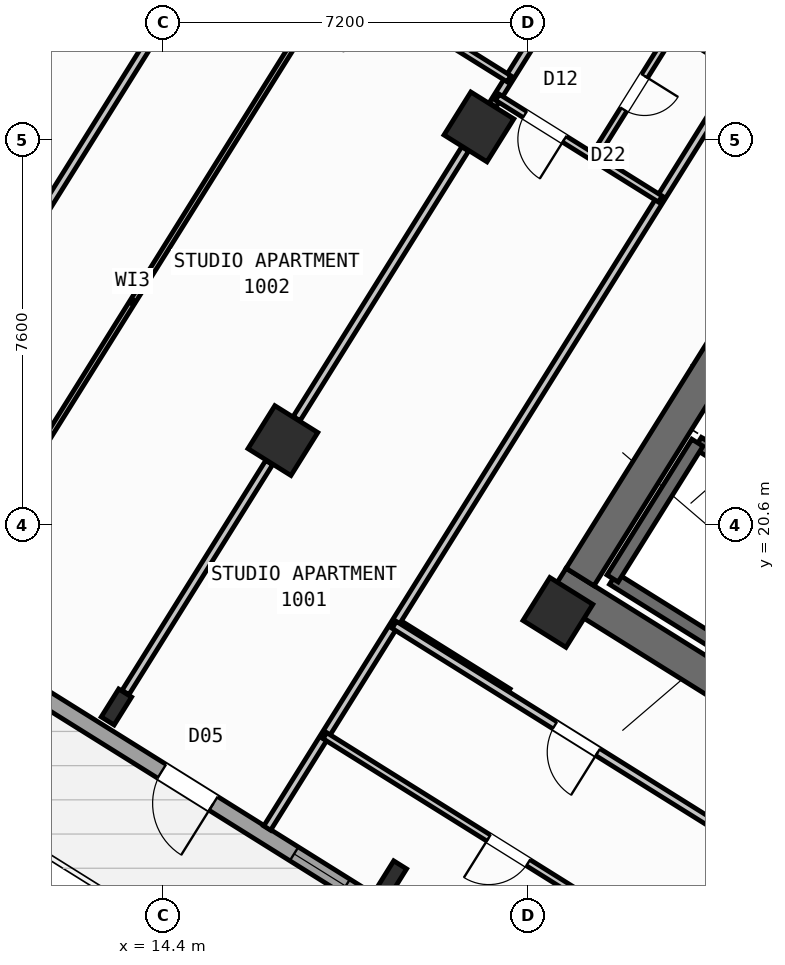
"""IFC4 building model, lengths in metres.
Left out: names, types, materials, properties, quantities, classifications, styles, units other than length and angle.
Written with IfcOpenShell. Run it as: python <this file> out.ifc"""

import sys

from ifc_helpers import new_model, si_unit, direction, frame, frame_2d, origin, origin_2d, place, context, subcontext, project, spatial, rectangle, hollow_rectangle, i_section, extrude, source, transform, mapped, element, fill, save


model = new_model("IFC4")
c1 = context("Model", 3, precision=1e-05, world=origin(), true_north=direction((0.0, 1.0)))
c2 = subcontext(c1, "Body", "Model", "MODEL_VIEW")
j1 = project(units=[si_unit("LENGTHUNIT", "METRE"), si_unit("PLANEANGLEUNIT", "RADIAN")], contexts=[c1])
p1 = place(None, origin())
s1 = spatial("IfcSite", under=j1, at=p1, CompositionType="ELEMENT")
p2 = place(p1, origin())
s2 = spatial("IfcBuilding", under=s1, at=p2, CompositionType="ELEMENT")
p3 = place(p2, frame((0.0, 0.0, 42.0)))
s3 = spatial("IfcBuildingStorey", under=s2, at=p3, CompositionType="ELEMENT", Elevation=42.0)
p4 = place(p3, frame((33.409, 12.45, 0.0), z_axis=(0.0, 0.0, 1.0), x_axis=(-0.848051132073, 0.529914405721, 0.0)))
e1 = element("IfcWall", 1, at=p4, inside=s3, PredefinedType="SHEAR", context=c2, shape_type="SweptSolid", body=[
    extrude(rectangle(XDim=13.24, YDim=0.65, at=frame_2d((6.62, 0.0))), origin(), (0.0, 0.0, 1.0), 3.35),
])
p5 = place(p3, frame((26.007, 24.976, 0.0), z_axis=(0.0, 0.0, 1.0), x_axis=(-0.529916319127, -0.848049936456, 0.0)))
e2 = element("IfcWall", 2, at=p5, inside=s3, PredefinedType="SHEAR", context=c2, shape_type="SweptSolid", body=[
    extrude(rectangle(XDim=6.375, YDim=0.65, at=frame_2d((3.188, 0.0))), origin(), (0.0, 0.0, 1.0), 3.35),
])
m1 = source(origin(), c2, "Body", "SweptSolid", [
    extrude(hollow_rectangle(XDim=1.0, YDim=1.0, WallThickness=0.04, at=origin_2d()), origin(), (0.0, 0.0, 1.0), 3.6),
])
p6 = place(p3, frame((22.191, 18.87, 0.0), z_axis=(0.0, 0.0, 1.0), x_axis=(-0.848048096156, 0.529919264233, 0.0)))
e3 = element("IfcColumn", 3, at=p6, inside=s3, PredefinedType="COLUMN", context=c2, shape_type="MappedRepresentation", body=[
    mapped(m1, transform((0.0, 0.0, 0.0), scale=1.0)),
])
m2 = source(origin(), c2, "Body", "SweptSolid", [
    extrude(i_section(OverallWidth=0.3, OverallDepth=0.65, WebThickness=0.016, FlangeThickness=0.031, at=origin_2d()), origin(), (0.0, 0.0, 1.0), 3.6),
])
p7 = place(p3, frame((18.906, 13.612, 0.0), z_axis=(0.0, 0.0, 1.0), x_axis=(-0.848048096156, 0.529919264233, 0.0)))
e4 = element("IfcColumn", 4, at=p7, inside=s3, PredefinedType="COLUMN", context=c2, shape_type="MappedRepresentation", body=[
    mapped(m2, transform((0.0, 0.0, 0.0), scale=1.0)),
])
for number, where, z_axis, x_axis in (
    (5, (20.632, 28.452, 0.0), (0.0, 0.0, 1.0), (-0.848, 0.53, 0.0)),
    (6, (16.764, 22.261, 0.0), (0.0, 0.0, 1.0), (-0.848, 0.53, 0.0)),
):
    element("IfcColumn", number, at=place(p3, frame(where, z_axis=z_axis, x_axis=x_axis)), inside=s3, PredefinedType="COLUMN", context=c2, shape_type="MappedRepresentation", body=[
        mapped(m1, transform((0.0, 0.0, 0.0), scale=1.0)),
    ])
p8 = place(p3, frame((13.478, 17.003, 0.0), z_axis=(0.0, 0.0, 1.0), x_axis=(-0.848048096156, 0.529919264233, 0.0)))
e7 = element("IfcColumn", 7, at=p8, inside=s3, PredefinedType="COLUMN", context=c2, shape_type="MappedRepresentation", body=[
    mapped(m2, transform((0.0, 0.0, 0.0), scale=1.0)),
])
p9 = place(p3, frame((29.268, 6.429, 0.0), z_axis=(0.0, 0.0, 1.0), x_axis=(-0.848049971435, 0.529916263149, 0.0)))
e8 = element("IfcWall", 8, at=p9, inside=s3, PredefinedType="STANDARD", context=c2, shape_type="SweptSolid", body=[
    extrude(rectangle(XDim=31.588, YDim=0.32, at=frame_2d((15.794, 0.0))), origin(), (0.0, 0.0, 1.0), 3.35),
])
p10 = place(p9, frame((16.362, 0.0, 0.0)))
e9 = element("IfcOpeningElement", 9, at=p10, cuts=e8, PredefinedType="OPENING", context=c2, shape_type="SweptSolid", body=[
    extrude(rectangle(XDim=1.2, YDim=2.15, at=frame_2d((0.6, 1.075))), frame((0.0, 0.17, 0.0), z_axis=(0.0, -1.0, 0.0), x_axis=(1.0, 0.0, 0.0)), (0.0, 0.0, 1.0), 0.34),
])
p11 = place(p9, frame((2.989, 0.0, 0.8)))
e10 = element("IfcOpeningElement", 10, at=p11, cuts=e8, PredefinedType="OPENING", context=c2, shape_type="SweptSolid", body=[
    extrude(rectangle(XDim=2.1, YDim=1.55, at=frame_2d((1.05, 0.775))), frame((0.0, 0.17, 0.0), z_axis=(0.0, -1.0, 0.0), x_axis=(1.0, 0.0, 0.0)), (0.0, 0.0, 1.0), 0.34),
])
p12 = place(p9, frame((8.359, 0.0, 0.8)))
e11 = element("IfcOpeningElement", 11, at=p12, cuts=e8, PredefinedType="OPENING", context=c2, shape_type="SweptSolid", body=[
    extrude(rectangle(XDim=2.1, YDim=1.55, at=frame_2d((1.05, 0.775))), frame((0.0, 0.17, 0.0), z_axis=(0.0, -1.0, 0.0), x_axis=(1.0, 0.0, 0.0)), (0.0, 0.0, 1.0), 0.34),
])
p13 = place(p9, frame((13.284, 0.0, 0.95)))
e12 = element("IfcOpeningElement", 12, at=p13, cuts=e8, PredefinedType="OPENING", context=c2, shape_type="SweptSolid", body=[
    extrude(rectangle(XDim=1.2, YDim=1.4, at=frame_2d((0.6, 0.7))), frame((0.0, 0.17, 0.0), z_axis=(0.0, -1.0, 0.0), x_axis=(1.0, 0.0, 0.0)), (0.0, 0.0, 1.0), 0.34),
])
p14 = place(p9, frame((20.39, 0.0, 0.95)))
e13 = element("IfcOpeningElement", 13, at=p14, cuts=e8, PredefinedType="OPENING", context=c2, shape_type="SweptSolid", body=[
    extrude(rectangle(XDim=1.2, YDim=1.4, at=frame_2d((0.6, 0.7))), frame((0.0, 0.17, 0.0), z_axis=(0.0, -1.0, 0.0), x_axis=(1.0, 0.0, 0.0)), (0.0, 0.0, 1.0), 0.34),
])
p15 = place(p9, frame((23.715, 0.0, 1.0)))
e14 = element("IfcOpeningElement", 14, at=p15, cuts=e8, PredefinedType="OPENING", context=c2, shape_type="SweptSolid", body=[
    extrude(rectangle(XDim=0.9, YDim=1.25, at=frame_2d((0.45, 0.625))), frame((0.0, 0.17, 0.0), z_axis=(0.0, -1.0, 0.0), x_axis=(1.0, 0.0, 0.0)), (0.0, 0.0, 1.0), 0.34),
])
p16 = place(p9, frame((27.481, 0.0, 0.8)))
e15 = element("IfcOpeningElement", 15, at=p16, cuts=e8, PredefinedType="OPENING", context=c2, shape_type="SweptSolid", body=[
    extrude(rectangle(XDim=2.1, YDim=1.55, at=frame_2d((1.05, 0.775))), frame((0.0, 0.17, 0.0), z_axis=(0.0, -1.0, 0.0), x_axis=(1.0, 0.0, 0.0)), (0.0, 0.0, 1.0), 0.34),
])
p17 = place(p3, frame((2.415, 23.452, 0.0), z_axis=(0.0, 0.0, 1.0), x_axis=(0.52991049553, 0.848053575387, 0.0)))
e16 = element("IfcWall", 16, at=p17, inside=s3, PredefinedType="STANDARD", context=c2, shape_type="SweptSolid", body=[
    extrude(rectangle(XDim=21.587, YDim=0.32, at=frame_2d((10.794, 0.0))), origin(), (0.0, 0.0, 1.0), 2.725),
])
p18 = place(p17, frame((2.356, 0.0, 0.8)))
e17 = element("IfcOpeningElement", 17, at=p18, cuts=e16, PredefinedType="OPENING", context=c2, shape_type="SweptSolid", body=[
    extrude(rectangle(XDim=2.1, YDim=1.55, at=frame_2d((1.05, 0.775))), frame((0.0, 0.17, 0.0), z_axis=(0.0, -1.0, 0.0), x_axis=(1.0, 0.0, 0.0)), (0.0, 0.0, 1.0), 0.34),
])
p19 = place(p17, frame((9.344, 0.0, 0.85)))
e18 = element("IfcOpeningElement", 18, at=p19, cuts=e16, PredefinedType="OPENING", context=c2, shape_type="SweptSolid", body=[
    extrude(rectangle(XDim=1.8, YDim=1.5, at=frame_2d((0.9, 0.75))), frame((0.0, 0.17, 0.0), z_axis=(0.0, -1.0, 0.0), x_axis=(1.0, 0.0, 0.0)), (0.0, 0.0, 1.0), 0.34),
])
p20 = place(p17, frame((15.154, 0.0, 0.85)))
e19 = element("IfcOpeningElement", 19, at=p20, cuts=e16, PredefinedType="OPENING", context=c2, shape_type="SweptSolid", body=[
    extrude(rectangle(XDim=1.5, YDim=1.5, at=frame_2d((0.75, 0.75))), frame((0.0, 0.17, 0.0), z_axis=(0.0, -1.0, 0.0), x_axis=(1.0, 0.0, 0.0)), (0.0, 0.0, 1.0), 0.34),
])
p21 = place(p3, frame((14.138, 41.825, 0.0), z_axis=(0.0, 0.0, 1.0), x_axis=(0.848046498049, -0.529921821731, 0.0)))
e20 = element("IfcWall", 20, at=p21, inside=s3, PredefinedType="STANDARD", context=c2, shape_type="SweptSolid", body=[
    extrude(rectangle(XDim=31.588, YDim=0.32, at=frame_2d((15.794, 0.0))), origin(), (0.0, 0.0, 1.0), 3.35),
])
p22 = place(p21, frame((3.369, 0.0, 0.0)))
e21 = element("IfcOpeningElement", 21, at=p22, cuts=e20, PredefinedType="OPENING", context=c2, shape_type="SweptSolid", body=[
    extrude(rectangle(XDim=1.05, YDim=2.15, at=frame_2d((0.525, 1.075))), frame((0.0, 0.17, 0.0), z_axis=(0.0, -1.0, 0.0), x_axis=(1.0, 0.0, 0.0)), (0.0, 0.0, 1.0), 0.34),
])
p23 = place(p21, frame((0.946, 0.0, 0.85)))
e22 = element("IfcOpeningElement", 22, at=p23, cuts=e20, PredefinedType="OPENING", context=c2, shape_type="SweptSolid", body=[
    extrude(rectangle(XDim=1.8, YDim=1.5, at=frame_2d((0.9, 0.75))), frame((0.0, 0.17, 0.0), z_axis=(0.0, -1.0, 0.0), x_axis=(1.0, 0.0, 0.0)), (0.0, 0.0, 1.0), 0.34),
])
p24 = place(p21, frame((8.46, 0.0, 0.85)))
e23 = element("IfcOpeningElement", 23, at=p24, cuts=e20, PredefinedType="OPENING", context=c2, shape_type="SweptSolid", body=[
    extrude(rectangle(XDim=1.8, YDim=1.5, at=frame_2d((0.9, 0.75))), frame((0.0, 0.17, 0.0), z_axis=(0.0, -1.0, 0.0), x_axis=(1.0, 0.0, 0.0)), (0.0, 0.0, 1.0), 0.34),
])
p25 = place(p21, frame((13.899, 0.0, 0.85)))
e24 = element("IfcOpeningElement", 24, at=p25, cuts=e20, PredefinedType="OPENING", context=c2, shape_type="SweptSolid", body=[
    extrude(rectangle(XDim=1.5, YDim=1.5, at=frame_2d((0.75, 0.75))), frame((0.0, 0.17, 0.0), z_axis=(0.0, -1.0, 0.0), x_axis=(1.0, 0.0, 0.0)), (0.0, 0.0, 1.0), 0.34),
])
p26 = place(p21, frame((22.019, 0.0, 0.95)))
e25 = element("IfcOpeningElement", 25, at=p26, cuts=e20, PredefinedType="OPENING", context=c2, shape_type="SweptSolid", body=[
    extrude(rectangle(XDim=1.2, YDim=1.4, at=frame_2d((0.6, 0.7))), frame((0.0, 0.17, 0.0), z_axis=(0.0, -1.0, 0.0), x_axis=(1.0, 0.0, 0.0)), (0.0, 0.0, 1.0), 0.34),
])
p27 = place(p21, frame((27.569, 0.0, 0.95)))
e26 = element("IfcOpeningElement", 26, at=p27, cuts=e20, PredefinedType="OPENING", context=c2, shape_type="SweptSolid", body=[
    extrude(rectangle(XDim=1.2, YDim=1.4, at=frame_2d((0.6, 0.7))), frame((0.0, 0.17, 0.0), z_axis=(0.0, -1.0, 0.0), x_axis=(1.0, 0.0, 0.0)), (0.0, 0.0, 1.0), 0.34),
])
p28 = place(p3, frame((29.605, 15.581, 0.0), z_axis=(0.0, 0.0, 1.0), x_axis=(-0.848036911448, 0.529937163087, 0.0)))
e27 = element("IfcWall", 27, at=p28, inside=s3, PredefinedType="SHEAR", context=c2, shape_type="SweptSolid", body=[
    extrude(rectangle(XDim=7.46, YDim=0.26, at=frame_2d((3.73, 0.0))), origin(), (0.0, 0.0, 1.0), 3.35),
])
p29 = place(p3, frame((31.28, 18.261, 0.0), z_axis=(0.0, 0.0, 1.0), x_axis=(-0.848051618787, 0.529913626805, 0.0)))
e28 = element("IfcWall", 28, at=p29, inside=s3, PredefinedType="SHEAR", context=c2, shape_type="SweptSolid", body=[
    extrude(rectangle(XDim=7.46, YDim=0.26, at=frame_2d((3.73, 0.0))), origin(), (0.0, 0.0, 1.0), 3.35),
])
p30 = place(p29, frame((0.36, 0.0, 0.0)))
e29 = element("IfcOpeningElement", 29, at=p30, cuts=e28, PredefinedType="OPENING", context=c2, shape_type="SweptSolid", body=[
    extrude(rectangle(XDim=0.86, YDim=2.05, at=frame_2d((0.43, 1.025))), frame((0.0, 0.14, 0.0), z_axis=(0.0, -1.0, 0.0), x_axis=(1.0, 0.0, 0.0)), (0.0, 0.0, 1.0), 0.28),
])
p31 = place(p3, frame((24.945, 22.22, 0.0), z_axis=(0.0, 0.0, 1.0), x_axis=(-0.529908658664, -0.84805472316, 0.0)))
e30 = element("IfcWall", 30, at=p31, inside=s3, PredefinedType="SHEAR", context=c2, shape_type="SweptSolid", body=[
    extrude(rectangle(XDim=3.16, YDim=0.26, at=frame_2d((1.58, 0.0))), origin(), (0.0, 0.0, 1.0), 3.35),
])
p32 = place(p3, frame((21.206, 17.292, 0.0), z_axis=(0.0, 0.0, 1.0), x_axis=(-0.848050851465, 0.529914854792, 0.0)))
e31 = element("IfcWall", 31, at=p32, inside=s3, PredefinedType="PARTITIONING", context=c2, shape_type="SweptSolid", body=[
    extrude(rectangle(XDim=2.61, YDim=0.16, at=frame_2d((1.305, 0.0))), origin(), (0.0, 0.0, 1.0), 3.34),
])
p33 = place(p3, frame((25.807, 29.582, 0.0), z_axis=(0.0, 0.0, 1.0), x_axis=(-0.529918119251, -0.84804881162, 0.0)))
e32 = element("IfcWall", 32, at=p33, inside=s3, PredefinedType="PARTITIONING", context=c2, shape_type="SweptSolid", body=[
    extrude(rectangle(XDim=17.65, YDim=0.16, at=frame_2d((8.825, 0.0))), origin(), (0.0, 0.0, 1.0), 3.34),
])
p34 = place(p3, frame((25.807, 29.582, 0.0), z_axis=(0.0, 0.0, 1.0), x_axis=(-0.848052408131, 0.529912363569, 0.0)))
e33 = element("IfcWall", 33, at=p34, inside=s3, PredefinedType="PARTITIONING", context=c2, shape_type="SweptSolid", body=[
    extrude(rectangle(XDim=16.73, YDim=0.16, at=frame_2d((8.365, 0.0))), origin(), (0.0, 0.0, 1.0), 3.34),
])
p35 = place(p34, frame((2.22, 0.0, 0.0)))
e34 = element("IfcOpeningElement", 34, at=p35, cuts=e33, PredefinedType="OPENING", context=c2, shape_type="SweptSolid", body=[
    extrude(rectangle(XDim=0.86, YDim=2.05, at=frame_2d((0.43, 1.025))), frame((0.0, 0.09, 0.0), z_axis=(0.0, -1.0, 0.0), x_axis=(1.0, 0.0, 0.0)), (0.0, 0.0, 1.0), 0.18),
])
p36 = place(p34, frame((7.82, 0.0, 0.0)))
e35 = element("IfcOpeningElement", 35, at=p36, cuts=e33, PredefinedType="OPENING", context=c2, shape_type="SweptSolid", body=[
    extrude(rectangle(XDim=1.0, YDim=2.1, at=frame_2d((0.5, 1.05))), frame((0.0, 0.09, 0.0), z_axis=(0.0, -1.0, 0.0), x_axis=(1.0, 0.0, 0.0)), (0.0, 0.0, 1.0), 0.18),
])
p37 = place(p34, frame((12.95, 0.0, 0.0)))
e36 = element("IfcOpeningElement", 36, at=p37, cuts=e33, PredefinedType="OPENING", context=c2, shape_type="SweptSolid", body=[
    extrude(rectangle(XDim=1.0, YDim=2.1, at=frame_2d((0.5, 1.05))), frame((0.0, 0.09, 0.0), z_axis=(0.0, -1.0, 0.0), x_axis=(1.0, 0.0, 0.0)), (0.0, 0.0, 1.0), 0.18),
])
p38 = place(p3, frame((22.593, 31.59, 0.0), z_axis=(0.0, 0.0, 1.0), x_axis=(-0.529930102756, -0.848041323399, 0.0)))
e37 = element("IfcWall", 37, at=p38, inside=s3, PredefinedType="PARTITIONING", context=c2, shape_type="SweptSolid", body=[
    extrude(rectangle(XDim=3.188, YDim=0.16, at=frame_2d((1.594, 0.0))), origin(), (0.0, 0.0, 1.0), 2.725),
])
p39 = place(p3, frame((20.361, 28.018, 0.0), z_axis=(0.0, 0.0, 1.0), x_axis=(-0.529915015264, -0.848050751193, 0.0)))
e38 = element("IfcWall", 38, at=p39, inside=s3, PredefinedType="PARTITIONING", context=c2, shape_type="SweptSolid", body=[
    extrude(rectangle(XDim=6.276, YDim=0.16, at=frame_2d((3.138, 0.0))), origin(), (0.0, 0.0, 1.0), 2.725),
])
p40 = place(p3, frame((16.492, 21.827, 0.0), z_axis=(0.0, 0.0, 1.0), x_axis=(-0.529904608059, -0.848057254175, 0.0)))
e39 = element("IfcWall", 39, at=p40, inside=s3, PredefinedType="PARTITIONING", context=c2, shape_type="SweptSolid", body=[
    extrude(rectangle(XDim=5.351, YDim=0.16, at=frame_2d((2.675, 0.0))), origin(), (0.0, 0.0, 1.0), 2.725),
])
p41 = place(p3, frame((24.212, 27.029, 0.0), z_axis=(0.0, 0.0, 1.0), x_axis=(-0.84803087207, 0.529946827537, 0.0)))
e40 = element("IfcWall", 40, at=p41, inside=s3, PredefinedType="PLUMBINGWALL", context=c2, shape_type="SweptSolid", body=[
    extrude(rectangle(XDim=3.79, YDim=0.14, at=frame_2d((1.895, 0.0))), origin(), (0.0, 0.0, 1.0), 3.34),
])
p42 = place(p41, frame((2.23, 0.0, 0.0)))
e41 = element("IfcOpeningElement", 41, at=p42, cuts=e40, PredefinedType="OPENING", context=c2, shape_type="SweptSolid", body=[
    extrude(rectangle(XDim=0.92, YDim=2.08, at=frame_2d((0.46, 1.04))), frame((0.0, 0.08, 0.0), z_axis=(0.0, -1.0, 0.0), x_axis=(1.0, 0.0, 0.0)), (0.0, 0.0, 1.0), 0.16),
])
p43 = place(p3, frame((24.492, 30.403, 0.0), z_axis=(0.0, 0.0, 1.0), x_axis=(-0.529977067289, -0.848011974059, 0.0)))
e42 = element("IfcWall", 42, at=p43, inside=s3, PredefinedType="PLUMBINGWALL", context=c2, shape_type="SweptSolid", body=[
    extrude(rectangle(XDim=3.01, YDim=0.14, at=frame_2d((1.505, 0.0))), origin(), (0.0, 0.0, 1.0), 2.995),
])
p44 = place(p43, frame((1.115, 0.0, 0.0)))
e43 = element("IfcOpeningElement", 43, at=p44, cuts=e42, PredefinedType="OPENING", context=c2, shape_type="SweptSolid", body=[
    extrude(rectangle(XDim=0.78, YDim=2.05, at=frame_2d((0.39, 1.025))), frame((0.0, 0.08, 0.0), z_axis=(0.0, -1.0, 0.0), x_axis=(1.0, 0.0, 0.0)), (0.0, 0.0, 1.0), 0.16),
])
p45 = place(p3, frame((14.933, 31.409, 0.0), z_axis=(0.0, 0.0, 1.0), x_axis=(-0.529897533635, -0.848061674554, 0.0)))
e44 = element("IfcWall", 44, at=p45, inside=s3, PredefinedType="PARTITIONING", context=c2, shape_type="SweptSolid", body=[
    extrude(rectangle(XDim=6.276, YDim=0.16, at=frame_2d((3.138, 0.0))), origin(), (0.0, 0.0, 1.0), 2.725),
])
p46 = place(p3, frame((21.226, 29.402, 0.0), z_axis=(0.0, 0.0, 1.0), x_axis=(-0.848039019877, 0.529933789039, 0.0)))
e45 = element("IfcWall", 45, at=p46, inside=s3, PredefinedType="PLUMBINGWALL", context=c2, shape_type="SweptSolid", body=[
    extrude(rectangle(XDim=6.4, YDim=0.14, at=frame_2d((3.2, 0.0))), origin(), (0.0, 0.0, 1.0), 3.34),
])
p47 = place(p46, frame((2.824, 0.0, 0.0)))
e46 = element("IfcOpeningElement", 46, at=p47, cuts=e45, PredefinedType="OPENING", context=c2, shape_type="SweptSolid", body=[
    extrude(rectangle(XDim=0.78, YDim=2.05, at=frame_2d((0.39, 1.025))), frame((0.0, 0.08, 0.0), z_axis=(0.0, -1.0, 0.0), x_axis=(1.0, 0.0, 0.0)), (0.0, 0.0, 1.0), 0.16),
])
p48 = place(p3, frame((17.861, 31.505, 0.0), z_axis=(0.0, 0.0, 1.0), x_axis=(-0.529928839727, -0.848042112649, 0.0)))
e47 = element("IfcWall", 47, at=p48, inside=s3, PredefinedType="PARTITIONING", context=c2, shape_type="SweptSolid", body=[
    extrude(rectangle(XDim=15.34, YDim=0.11, at=frame_2d((7.67, 0.0))), origin(), (0.0, 0.0, 1.0), 3.34),
])
p49 = place(p48, frame((0.35, 0.0, 0.0)))
e48 = element("IfcOpeningElement", 48, at=p49, cuts=e47, PredefinedType="OPENING", context=c2, shape_type="SweptSolid", body=[
    extrude(rectangle(XDim=0.92, YDim=2.08, at=frame_2d((0.46, 1.04))), frame((0.0, 0.065, 0.0), z_axis=(0.0, -1.0, 0.0), x_axis=(1.0, 0.0, 0.0)), (0.0, 0.0, 1.0), 0.13),
])
p50 = place(p3, frame((32.164, 10.374, 0.0), z_axis=(0.0, 0.0, 1.0), x_axis=(-0.848044107957, 0.529925646633, 0.0)))
e49 = element("IfcWall", 49, at=p50, inside=s3, PredefinedType="PARTITIONING", context=c2, shape_type="SweptSolid", body=[
    extrude(rectangle(XDim=15.57, YDim=0.16, at=frame_2d((7.785, 0.0))), origin(), (0.0, 0.0, 1.0), 3.34),
])
p51 = place(p50, frame((10.83, 0.0, 0.0)))
e50 = element("IfcOpeningElement", 50, at=p51, cuts=e49, PredefinedType="OPENING", context=c2, shape_type="SweptSolid", body=[
    extrude(rectangle(XDim=1.0, YDim=2.1, at=frame_2d((0.5, 1.05))), frame((0.0, 0.09, 0.0), z_axis=(0.0, -1.0, 0.0), x_axis=(1.0, 0.0, 0.0)), (0.0, 0.0, 1.0), 0.18),
])
p52 = place(p3, frame((29.72, 8.859, 0.0), z_axis=(0.0, 0.0, 1.0), x_axis=(-0.848049134363, 0.529917602752, 0.0)))
e51 = element("IfcWall", 51, at=p52, inside=s3, PredefinedType="PLUMBINGWALL", context=c2, shape_type="SweptSolid", body=[
    extrude(rectangle(XDim=14.3, YDim=0.14, at=frame_2d((7.15, 0.0))), origin(), (0.0, 0.0, 1.0), 3.34),
])
p53 = place(p52, frame((9.57, 0.0, 0.0)))
e52 = element("IfcOpeningElement", 52, at=p53, cuts=e51, PredefinedType="OPENING", context=c2, shape_type="SweptSolid", body=[
    extrude(rectangle(XDim=0.92, YDim=2.08, at=frame_2d((0.46, 1.04))), frame((0.0, 0.08, 0.0), z_axis=(0.0, -1.0, 0.0), x_axis=(1.0, 0.0, 0.0)), (0.0, 0.0, 1.0), 0.16),
])
p54 = place(p3, frame((26.237, 14.078, 0.0), z_axis=(0.0, 0.0, 1.0), x_axis=(-0.52995640672, -0.848024885824, 0.0)))
e53 = element("IfcWall", 53, at=p54, inside=s3, PredefinedType="PLUMBINGWALL", context=c2, shape_type="SweptSolid", body=[
    extrude(rectangle(XDim=2.58, YDim=0.14, at=frame_2d((1.29, 0.0))), origin(), (0.0, 0.0, 1.0), 3.34),
])
p55 = place(p54, frame((0.9, 0.0, 0.0)))
e54 = element("IfcOpeningElement", 54, at=p55, cuts=e53, PredefinedType="OPENING", context=c2, shape_type="SweptSolid", body=[
    extrude(rectangle(XDim=0.78, YDim=2.05, at=frame_2d((0.39, 1.025))), frame((0.0, 0.08, 0.0), z_axis=(0.0, -1.0, 0.0), x_axis=(1.0, 0.0, 0.0)), (0.0, 0.0, 1.0), 0.16),
])
m3 = source(origin(), c2, "Body", "SweptSolid", [
    extrude(rectangle(XDim=1.2, YDim=2.15, at=frame_2d((0.6, 1.075))), frame((0.0, 0.025, 0.0), z_axis=(0.0, -1.0, 0.0), x_axis=(1.0, 0.0, 0.0)), (0.0, 0.0, 1.0), 0.05),
])
p56 = place(p10, origin())
e55 = element("IfcDoor", 55, at=p56, inside=s3, OperationType="SINGLE_SWING_LEFT", PredefinedType="DOOR", context=c2, shape_type="MappedRepresentation", body=[
    mapped(m3, transform((0.0, 0.0, 0.0), scale=1.0)),
])
fill(e9, e55)
m4 = source(origin(), c2, "Body", "SweptSolid", [
    extrude(rectangle(XDim=1.2, YDim=1.4, at=frame_2d((0.6, 0.7))), frame((0.0, 0.03, 0.0), z_axis=(0.0, -1.0, 0.0), x_axis=(1.0, 0.0, 0.0)), (0.0, 0.0, 1.0), 0.06),
])
p57 = place(p13, origin())
e56 = element("IfcWindow", 56, at=p57, inside=s3, PartitioningType="SINGLE_PANEL", PredefinedType="WINDOW", context=c2, shape_type="MappedRepresentation", body=[
    mapped(m4, transform((0.0, 0.0, 0.0), scale=1.0)),
])
fill(e12, e56)
m5 = source(origin(), c2, "Body", "SweptSolid", [
    extrude(rectangle(XDim=0.92, YDim=2.08, at=frame_2d((0.46, 1.04))), frame((0.0, 0.025, 0.0), z_axis=(0.0, -1.0, 0.0), x_axis=(1.0, 0.0, 0.0)), (0.0, 0.0, 1.0), 0.05),
])
p58 = place(p42, origin())
e57 = element("IfcDoor", 57, at=p58, inside=s3, OperationType="SINGLE_SWING_LEFT", PredefinedType="DOOR", context=c2, shape_type="MappedRepresentation", body=[
    mapped(m5, transform((0.0, 0.0, 0.0), scale=1.0)),
])
fill(e41, e57)
m6 = source(origin(), c2, "Body", "SweptSolid", [
    extrude(rectangle(XDim=0.78, YDim=2.05, at=frame_2d((0.39, 1.025))), frame((0.0, 0.025, 0.0), z_axis=(0.0, -1.0, 0.0), x_axis=(1.0, 0.0, 0.0)), (0.0, 0.0, 1.0), 0.05),
])
p59 = place(p44, origin())
e58 = element("IfcDoor", 58, at=p59, inside=s3, OperationType="SINGLE_SWING_LEFT", PredefinedType="DOOR", context=c2, shape_type="MappedRepresentation", body=[
    mapped(m6, transform((0.0, 0.0, 0.0), scale=1.0)),
])
fill(e43, e58)
m7 = source(origin(), c2, "Body", "SweptSolid", [
    extrude(rectangle(XDim=1.0, YDim=2.1, at=frame_2d((0.5, 1.05))), frame((0.0, 0.025, 0.0), z_axis=(0.0, -1.0, 0.0), x_axis=(1.0, 0.0, 0.0)), (0.0, 0.0, 1.0), 0.05),
])
p60 = place(p51, origin())
e59 = element("IfcDoor", 59, at=p60, inside=s3, OperationType="SINGLE_SWING_LEFT", PredefinedType="DOOR", context=c2, shape_type="MappedRepresentation", body=[
    mapped(m7, transform((0.0, 0.0, 0.0), scale=1.0)),
])
fill(e50, e59)
p61 = place(p53, origin())
e60 = element("IfcDoor", 60, at=p61, inside=s3, OperationType="SINGLE_SWING_RIGHT", PredefinedType="DOOR", context=c2, shape_type="MappedRepresentation", body=[
    mapped(m5, transform((0.0, 0.0, 0.0), scale=1.0)),
])
fill(e52, e60)
save(model, sys.argv[1])
